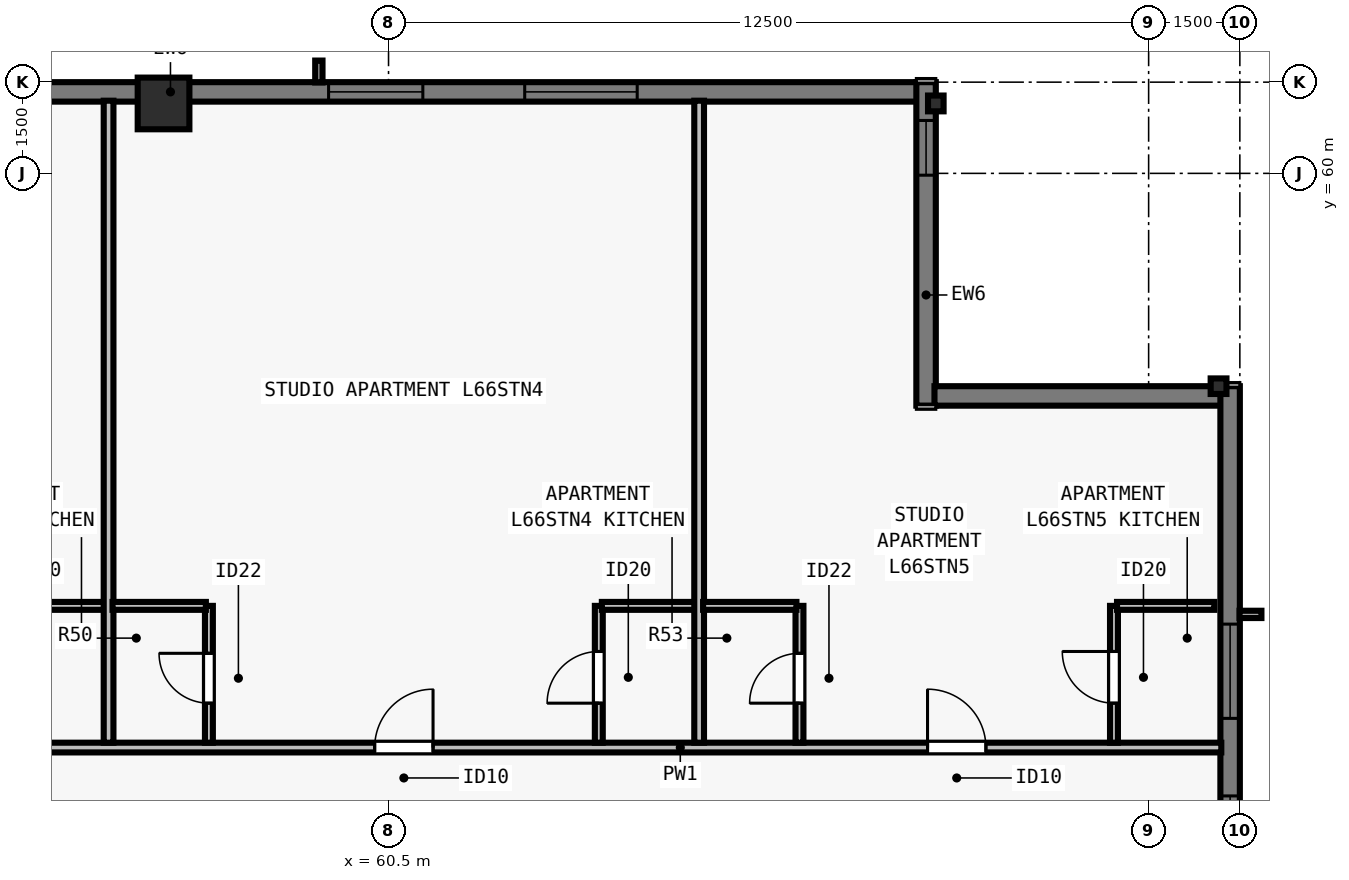
"""IFC4 building model, lengths in metres.
Left out: names, types, materials, properties, quantities, classifications, styles, units other than length and angle.
Written with IfcOpenShell. Run it as: python <this file> out.ifc"""

import sys

from ifc_helpers import new_model, si_unit, direction, frame, frame_2d, origin, origin_2d, place, context, subcontext, project, spatial, rectangle, i_section, extrude, element, fill, save


model = new_model("IFC4")
c1 = context("Model", 3, precision=1e-05, world=origin(), true_north=direction((0.0, 1.0)))
c2 = subcontext(c1, "Body", "Model", "MODEL_VIEW")
j1 = project(units=[si_unit("LENGTHUNIT", "METRE"), si_unit("PLANEANGLEUNIT", "RADIAN")], contexts=[c1])
p1 = place(None, origin())
s1 = spatial("IfcSite", under=j1, at=p1, CompositionType="ELEMENT")
p2 = place(p1, origin())
s2 = spatial("IfcBuilding", under=s1, at=p2, CompositionType="ELEMENT")
p3 = place(p2, frame((0.0, 0.0, 241.0)))
s3 = spatial("IfcBuildingStorey", under=s2, at=p3, CompositionType="ELEMENT", Elevation=241.0)
for number, where, z_axis, x_axis in (
    (1, (74.15, 56.5, 0.0), (0.0, 0.0, 1.0), (0.0, 1.0, 0.0)),
    (2, (69.5, 61.15, 0.0), (0.0, 0.0, 1.0), (1.0, 0.0, 0.0)),
):
    element("IfcColumn", number, at=place(p3, frame(where, z_axis=z_axis, x_axis=x_axis)), inside=s3, PredefinedType="COLUMN", context=c2, shape_type="SweptSolid", body=[
        extrude(i_section(OverallWidth=0.256, OverallDepth=0.26, WebThickness=0.01, FlangeThickness=0.017, FilletRadius=0.013, at=origin_2d()), origin(), (0.0, 0.0, 1.0), 3.5),
    ])
p4 = place(p3, frame((56.8, 61.15, 0.0), z_axis=(0.0, 0.0, 1.0), x_axis=(1.0, 0.0, 0.0)))
e3 = element("IfcColumn", 3, at=p4, inside=s3, PredefinedType="COLUMN", context=c2, shape_type="SweptSolid", body=[
    extrude(rectangle(XDim=0.85, YDim=0.85, at=origin_2d()), origin(), (0.0, 0.0, 1.0), 3.5),
])
p5 = place(p3, frame((34.5, 61.34, 0.0), z_axis=(0.0, 0.0, 1.0), x_axis=(1.0, 0.0, 0.0)))
e4 = element("IfcWall", 4, at=p5, inside=s3, PredefinedType="SOLIDWALL", context=c2, shape_type="SweptSolid", body=[
    extrude(rectangle(XDim=34.702, YDim=0.32, at=frame_2d((17.351, 0.0))), origin(), (0.0, 0.0, 1.0), 3.29),
])
p6 = place(p5, frame((4.763, 0.0, 0.8)))
e5 = element("IfcOpeningElement", 5, at=p6, cuts=e4, PredefinedType="OPENING", context=c2, shape_type="SweptSolid", body=[
    extrude(rectangle(XDim=1.55, YDim=1.678, at=frame_2d((0.775, 0.839))), frame((0.0, 0.17, 0.0), z_axis=(0.0, -1.0, 0.0), x_axis=(1.0, 0.0, 0.0)), (0.0, 0.0, 1.0), 0.34),
])
p7 = place(p5, frame((7.988, 0.0, 0.8)))
e6 = element("IfcOpeningElement", 6, at=p7, cuts=e4, PredefinedType="OPENING", context=c2, shape_type="SweptSolid", body=[
    extrude(rectangle(XDim=1.85, YDim=1.678, at=frame_2d((0.925, 0.839))), frame((0.0, 0.17, 0.0), z_axis=(0.0, -1.0, 0.0), x_axis=(1.0, 0.0, 0.0)), (0.0, 0.0, 1.0), 0.34),
])
p8 = place(p5, frame((10.263, 0.0, 0.8)))
e7 = element("IfcOpeningElement", 7, at=p8, cuts=e4, PredefinedType="OPENING", context=c2, shape_type="SweptSolid", body=[
    extrude(rectangle(XDim=1.55, YDim=1.678, at=frame_2d((0.775, 0.839))), frame((0.0, 0.17, 0.0), z_axis=(0.0, -1.0, 0.0), x_axis=(1.0, 0.0, 0.0)), (0.0, 0.0, 1.0), 0.34),
])
p9 = place(p5, frame((14.738, 0.0, 0.8)))
e8 = element("IfcOpeningElement", 8, at=p9, cuts=e4, PredefinedType="OPENING", context=c2, shape_type="SweptSolid", body=[
    extrude(rectangle(XDim=1.85, YDim=1.678, at=frame_2d((0.925, 0.839))), frame((0.0, 0.17, 0.0), z_axis=(0.0, -1.0, 0.0), x_axis=(1.0, 0.0, 0.0)), (0.0, 0.0, 1.0), 0.34),
])
p10 = place(p5, frame((18.264, 0.0, 0.8)))
e9 = element("IfcOpeningElement", 9, at=p10, cuts=e4, PredefinedType="OPENING", context=c2, shape_type="SweptSolid", body=[
    extrude(rectangle(XDim=1.55, YDim=1.678, at=frame_2d((0.775, 0.839))), frame((0.0, 0.17, 0.0), z_axis=(0.0, -1.0, 0.0), x_axis=(1.0, 0.0, 0.0)), (0.0, 0.0, 1.0), 0.34),
])
p11 = place(p5, frame((25.014, 0.0, 0.8)))
e10 = element("IfcOpeningElement", 10, at=p11, cuts=e4, PredefinedType="OPENING", context=c2, shape_type="SweptSolid", body=[
    extrude(rectangle(XDim=1.55, YDim=1.678, at=frame_2d((0.775, 0.839))), frame((0.0, 0.17, 0.0), z_axis=(0.0, -1.0, 0.0), x_axis=(1.0, 0.0, 0.0)), (0.0, 0.0, 1.0), 0.34),
])
p12 = place(p5, frame((28.24, 0.0, 0.8)))
e11 = element("IfcOpeningElement", 11, at=p12, cuts=e4, PredefinedType="OPENING", context=c2, shape_type="SweptSolid", body=[
    extrude(rectangle(XDim=1.85, YDim=1.678, at=frame_2d((0.925, 0.839))), frame((0.0, 0.17, 0.0), z_axis=(0.0, -1.0, 0.0), x_axis=(1.0, 0.0, 0.0)), (0.0, 0.0, 1.0), 0.34),
])
p13 = place(p3, frame((69.34, 61.5, 0.0), z_axis=(0.0, 0.0, 1.0), x_axis=(0.0, -1.0, 0.0)))
e12 = element("IfcWall", 12, at=p13, inside=s3, PredefinedType="SOLIDWALL", context=c2, shape_type="SweptSolid", body=[
    extrude(rectangle(XDim=5.32, YDim=0.32, at=frame_2d((2.66, 0.0))), origin(), (0.0, 0.0, 1.0), 3.29),
])
p14 = place(p13, frame((0.63, 0.0, 0.8)))
e13 = element("IfcOpeningElement", 13, at=p14, cuts=e12, PredefinedType="OPENING", context=c2, shape_type="SweptSolid", body=[
    extrude(rectangle(XDim=0.9, YDim=1.678, at=frame_2d((0.45, 0.839))), frame((0.0, 0.17, 0.0), z_axis=(0.0, -1.0, 0.0), x_axis=(1.0, 0.0, 0.0)), (0.0, 0.0, 1.0), 0.34),
])
p15 = place(p3, frame((69.478, 56.34, 0.0), z_axis=(0.0, 0.0, 1.0), x_axis=(1.0, 0.0, 0.0)))
e14 = element("IfcWall", 14, at=p15, inside=s3, PredefinedType="SOLIDWALL", context=c2, shape_type="SweptSolid", body=[
    extrude(rectangle(XDim=4.724, YDim=0.32, at=frame_2d((2.362, 0.0))), origin(), (0.0, 0.0, 1.0), 3.29),
])
p16 = place(p3, frame((74.34, 56.5, 0.0), z_axis=(0.0, 0.0, 1.0), x_axis=(0.0, -1.0, 0.0)))
e15 = element("IfcWall", 15, at=p16, inside=s3, PredefinedType="SOLIDWALL", context=c2, shape_type="SweptSolid", body=[
    extrude(rectangle(XDim=34.702, YDim=0.32, at=frame_2d((17.351, 0.0))), origin(), (0.0, 0.0, 1.0), 3.29),
])
p17 = place(p16, frame((3.913, 0.0, 0.8)))
e16 = element("IfcOpeningElement", 16, at=p17, cuts=e15, PredefinedType="OPENING", context=c2, shape_type="SweptSolid", body=[
    extrude(rectangle(XDim=1.55, YDim=1.678, at=frame_2d((0.775, 0.839))), frame((0.0, 0.17, 0.0), z_axis=(0.0, -1.0, 0.0), x_axis=(1.0, 0.0, 0.0)), (0.0, 0.0, 1.0), 0.34),
])
p18 = place(p16, frame((6.738, 0.0, 0.8)))
e17 = element("IfcOpeningElement", 17, at=p18, cuts=e15, PredefinedType="OPENING", context=c2, shape_type="SweptSolid", body=[
    extrude(rectangle(XDim=1.85, YDim=1.678, at=frame_2d((0.925, 0.839))), frame((0.0, 0.17, 0.0), z_axis=(0.0, -1.0, 0.0), x_axis=(1.0, 0.0, 0.0)), (0.0, 0.0, 1.0), 0.34),
])
p19 = place(p16, frame((10.263, 0.0, 0.8)))
e18 = element("IfcOpeningElement", 18, at=p19, cuts=e15, PredefinedType="OPENING", context=c2, shape_type="SweptSolid", body=[
    extrude(rectangle(XDim=1.55, YDim=1.678, at=frame_2d((0.775, 0.839))), frame((0.0, 0.17, 0.0), z_axis=(0.0, -1.0, 0.0), x_axis=(1.0, 0.0, 0.0)), (0.0, 0.0, 1.0), 0.34),
])
p20 = place(p16, frame((14.738, 0.0, 0.8)))
e19 = element("IfcOpeningElement", 19, at=p20, cuts=e15, PredefinedType="OPENING", context=c2, shape_type="SweptSolid", body=[
    extrude(rectangle(XDim=1.85, YDim=1.678, at=frame_2d((0.925, 0.839))), frame((0.0, 0.17, 0.0), z_axis=(0.0, -1.0, 0.0), x_axis=(1.0, 0.0, 0.0)), (0.0, 0.0, 1.0), 0.34),
])
p21 = place(p16, frame((18.264, 0.0, 0.8)))
e20 = element("IfcOpeningElement", 20, at=p21, cuts=e15, PredefinedType="OPENING", context=c2, shape_type="SweptSolid", body=[
    extrude(rectangle(XDim=1.55, YDim=1.678, at=frame_2d((0.775, 0.839))), frame((0.0, 0.17, 0.0), z_axis=(0.0, -1.0, 0.0), x_axis=(1.0, 0.0, 0.0)), (0.0, 0.0, 1.0), 0.34),
])
p22 = place(p16, frame((24.164, 0.0, 0.8)))
e21 = element("IfcOpeningElement", 21, at=p22, cuts=e15, PredefinedType="OPENING", context=c2, shape_type="SweptSolid", body=[
    extrude(rectangle(XDim=1.55, YDim=1.678, at=frame_2d((0.775, 0.839))), frame((0.0, 0.17, 0.0), z_axis=(0.0, -1.0, 0.0), x_axis=(1.0, 0.0, 0.0)), (0.0, 0.0, 1.0), 0.34),
])
p23 = place(p3, frame((29.805, 50.558, 0.0), z_axis=(0.0, 0.0, 1.0), x_axis=(1.0, 0.0, 0.0)))
e22 = element("IfcWall", 22, at=p23, inside=s3, PredefinedType="PARTITIONING", context=c2, shape_type="SweptSolid", body=[
    extrude(rectangle(XDim=44.39, YDim=0.16, at=frame_2d((22.195, 0.0))), origin(), (0.0, 0.0, 1.0), 2.958),
])
p24 = place(p23, frame((3.791, 0.0, 0.0)))
e23 = element("IfcOpeningElement", 23, at=p24, cuts=e22, PredefinedType="OPENING", context=c2, shape_type="SweptSolid", body=[
    extrude(rectangle(XDim=0.96, YDim=2.18, at=frame_2d((0.48, 1.09))), frame((0.0, 0.09, 0.0), z_axis=(0.0, -1.0, 0.0), x_axis=(1.0, 0.0, 0.0)), (0.0, 0.0, 1.0), 0.18),
])
p25 = place(p23, frame((12.803, 0.0, 0.0)))
e24 = element("IfcOpeningElement", 24, at=p25, cuts=e22, PredefinedType="OPENING", context=c2, shape_type="SweptSolid", body=[
    extrude(rectangle(XDim=0.96, YDim=2.18, at=frame_2d((0.48, 1.09))), frame((0.0, 0.09, 0.0), z_axis=(0.0, -1.0, 0.0), x_axis=(1.0, 0.0, 0.0)), (0.0, 0.0, 1.0), 0.18),
])
p26 = place(p23, frame((21.635, 0.0, 0.0)))
e25 = element("IfcOpeningElement", 25, at=p26, cuts=e22, PredefinedType="OPENING", context=c2, shape_type="SweptSolid", body=[
    extrude(rectangle(XDim=0.96, YDim=2.18, at=frame_2d((0.48, 1.09))), frame((0.0, 0.09, 0.0), z_axis=(0.0, -1.0, 0.0), x_axis=(1.0, 0.0, 0.0)), (0.0, 0.0, 1.0), 0.18),
])
p27 = place(p23, frame((30.467, 0.0, 0.0)))
e26 = element("IfcOpeningElement", 26, at=p27, cuts=e22, PredefinedType="OPENING", context=c2, shape_type="SweptSolid", body=[
    extrude(rectangle(XDim=0.96, YDim=2.18, at=frame_2d((0.48, 1.09))), frame((0.0, 0.09, 0.0), z_axis=(0.0, -1.0, 0.0), x_axis=(1.0, 0.0, 0.0)), (0.0, 0.0, 1.0), 0.18),
])
p28 = place(p23, frame((39.559, 0.0, 0.0)))
e27 = element("IfcOpeningElement", 27, at=p28, cuts=e22, PredefinedType="OPENING", context=c2, shape_type="SweptSolid", body=[
    extrude(rectangle(XDim=0.96, YDim=2.18, at=frame_2d((0.48, 1.09))), frame((0.0, 0.09, 0.0), z_axis=(0.0, -1.0, 0.0), x_axis=(1.0, 0.0, 0.0)), (0.0, 0.0, 1.0), 0.18),
])
p29 = place(p3, frame((54.296, 52.887, 0.0), z_axis=(0.0, 0.0, 1.0), x_axis=(1.0, 0.0, 0.0)))
e28 = element("IfcWall", 28, at=p29, inside=s3, PredefinedType="PLUMBINGWALL", context=c2, shape_type="SweptSolid", body=[
    extrude(rectangle(XDim=1.6, YDim=0.13, at=frame_2d((0.8, 0.0))), origin(), (0.0, 0.0, 1.0), 3.29),
])
p30 = place(p3, frame((55.896, 50.637, 0.0), z_axis=(0.0, 0.0, 1.0), x_axis=(0.0, 1.0, 0.0)))
e29 = element("IfcWall", 29, at=p30, inside=s3, PredefinedType="PARTITIONING", context=c2, shape_type="SweptSolid", body=[
    extrude(rectangle(XDim=10.558, YDim=0.16, at=frame_2d((5.279, 0.0))), origin(), (0.0, 0.0, 1.0), 2.958),
])
p31 = place(p3, frame((57.546, 50.637, 0.0), z_axis=(0.0, 0.0, 1.0), x_axis=(0.0, 1.0, 0.0)))
e30 = element("IfcWall", 30, at=p31, inside=s3, PredefinedType="PLUMBINGWALL", context=c2, shape_type="SweptSolid", body=[
    extrude(rectangle(XDim=2.25, YDim=0.13, at=frame_2d((1.125, 0.0))), origin(), (0.0, 0.0, 1.0), 3.29),
])
p32 = place(p31, frame((0.65, 0.0, 0.0)))
e31 = element("IfcOpeningElement", 31, at=p32, cuts=e30, PredefinedType="OPENING", context=c2, shape_type="SweptSolid", body=[
    extrude(rectangle(XDim=0.82, YDim=2.1, at=frame_2d((0.41, 1.05))), frame((0.0, 0.075, 0.0), z_axis=(0.0, -1.0, 0.0), x_axis=(1.0, 0.0, 0.0)), (0.0, 0.0, 1.0), 0.15),
])
p33 = place(p3, frame((55.961, 52.887, 0.0), z_axis=(0.0, 0.0, 1.0), x_axis=(1.0, 0.0, 0.0)))
e32 = element("IfcWall", 32, at=p33, inside=s3, PredefinedType="PLUMBINGWALL", context=c2, shape_type="SweptSolid", body=[
    extrude(rectangle(XDim=1.535, YDim=0.13, at=frame_2d((0.768, 0.0))), origin(), (0.0, 0.0, 1.0), 3.29),
])
p34 = place(p3, frame((63.958, 50.637, 0.0), z_axis=(0.0, 0.0, 1.0), x_axis=(0.0, 1.0, 0.0)))
e33 = element("IfcWall", 33, at=p34, inside=s3, PredefinedType="PLUMBINGWALL", context=c2, shape_type="SweptSolid", body=[
    extrude(rectangle(XDim=2.25, YDim=0.13, at=frame_2d((1.125, 0.0))), origin(), (0.0, 0.0, 1.0), 2.573),
])
p35 = place(p34, frame((0.65, 0.0, 0.0)))
e34 = element("IfcOpeningElement", 34, at=p35, cuts=e33, PredefinedType="OPENING", context=c2, shape_type="SweptSolid", body=[
    extrude(rectangle(XDim=0.85, YDim=2.1, at=frame_2d((0.425, 1.05))), frame((0.0, 0.075, 0.0), z_axis=(0.0, -1.0, 0.0), x_axis=(1.0, 0.0, 0.0)), (0.0, 0.0, 1.0), 0.15),
])
p36 = place(p3, frame((64.008, 52.887, 0.0), z_axis=(0.0, 0.0, 1.0), x_axis=(1.0, 0.0, 0.0)))
e35 = element("IfcWall", 35, at=p36, inside=s3, PredefinedType="PLUMBINGWALL", context=c2, shape_type="SweptSolid", body=[
    extrude(rectangle(XDim=1.6, YDim=0.13, at=frame_2d((0.8, 0.0))), origin(), (0.0, 0.0, 1.0), 3.29),
])
p37 = place(p3, frame((65.608, 50.637, 0.0), z_axis=(0.0, 0.0, 1.0), x_axis=(0.0, 1.0, 0.0)))
e36 = element("IfcWall", 36, at=p37, inside=s3, PredefinedType="PARTITIONING", context=c2, shape_type="SweptSolid", body=[
    extrude(rectangle(XDim=10.558, YDim=0.16, at=frame_2d((5.279, 0.0))), origin(), (0.0, 0.0, 1.0), 2.573),
])
p38 = place(p3, frame((67.258, 50.637, 0.0), z_axis=(0.0, 0.0, 1.0), x_axis=(0.0, 1.0, 0.0)))
e37 = element("IfcWall", 37, at=p38, inside=s3, PredefinedType="PLUMBINGWALL", context=c2, shape_type="SweptSolid", body=[
    extrude(rectangle(XDim=2.25, YDim=0.13, at=frame_2d((1.125, 0.0))), origin(), (0.0, 0.0, 1.0), 3.29),
])
p39 = place(p38, frame((0.65, 0.0, 0.0)))
e38 = element("IfcOpeningElement", 38, at=p39, cuts=e37, PredefinedType="OPENING", context=c2, shape_type="SweptSolid", body=[
    extrude(rectangle(XDim=0.82, YDim=2.1, at=frame_2d((0.41, 1.05))), frame((0.0, 0.075, 0.0), z_axis=(0.0, -1.0, 0.0), x_axis=(1.0, 0.0, 0.0)), (0.0, 0.0, 1.0), 0.15),
])
p40 = place(p3, frame((65.673, 52.887, 0.0), z_axis=(0.0, 0.0, 1.0), x_axis=(1.0, 0.0, 0.0)))
e39 = element("IfcWall", 39, at=p40, inside=s3, PredefinedType="PLUMBINGWALL", context=c2, shape_type="SweptSolid", body=[
    extrude(rectangle(XDim=1.535, YDim=0.13, at=frame_2d((0.768, 0.0))), origin(), (0.0, 0.0, 1.0), 3.29),
])
p41 = place(p3, frame((72.43, 50.637, 0.0), z_axis=(0.0, 0.0, 1.0), x_axis=(0.0, 1.0, 0.0)))
e40 = element("IfcWall", 40, at=p41, inside=s3, PredefinedType="PLUMBINGWALL", context=c2, shape_type="SweptSolid", body=[
    extrude(rectangle(XDim=2.25, YDim=0.13, at=frame_2d((1.125, 0.0))), origin(), (0.0, 0.0, 1.0), 3.29),
])
p42 = place(p41, frame((0.65, 0.0, 0.0)))
e41 = element("IfcOpeningElement", 41, at=p42, cuts=e40, PredefinedType="OPENING", context=c2, shape_type="SweptSolid", body=[
    extrude(rectangle(XDim=0.85, YDim=2.1, at=frame_2d((0.425, 1.05))), frame((0.0, 0.075, 0.0), z_axis=(0.0, -1.0, 0.0), x_axis=(1.0, 0.0, 0.0)), (0.0, 0.0, 1.0), 0.15),
])
p43 = place(p3, frame((72.48, 52.887, 0.0), z_axis=(0.0, 0.0, 1.0), x_axis=(1.0, 0.0, 0.0)))
e42 = element("IfcWall", 42, at=p43, inside=s3, PredefinedType="PLUMBINGWALL", context=c2, shape_type="SweptSolid", body=[
    extrude(rectangle(XDim=1.6, YDim=0.13, at=frame_2d((0.8, 0.0))), origin(), (0.0, 0.0, 1.0), 3.29),
])
p44 = place(p11, origin())
e43 = element("IfcWindow", 43, at=p44, inside=s3, PartitioningType="SINGLE_PANEL", PredefinedType="WINDOW", context=c2, shape_type="SweptSolid", body=[
    extrude(rectangle(XDim=1.55, YDim=1.678, at=frame_2d((0.775, 0.839))), frame((0.0, -0.05, 0.0), z_axis=(0.0, -1.0, 0.0), x_axis=(1.0, 0.0, 0.0)), (0.0, 0.0, 1.0), 0.06),
])
fill(e10, e43)
p45 = place(p12, origin())
e44 = element("IfcWindow", 44, at=p45, inside=s3, PartitioningType="SINGLE_PANEL", PredefinedType="WINDOW", context=c2, shape_type="SweptSolid", body=[
    extrude(rectangle(XDim=1.85, YDim=1.678, at=frame_2d((0.925, 0.839))), frame((0.0, -0.05, 0.0), z_axis=(0.0, -1.0, 0.0), x_axis=(1.0, 0.0, 0.0)), (0.0, 0.0, 1.0), 0.06),
])
fill(e11, e44)
p46 = place(p17, origin())
e45 = element("IfcWindow", 45, at=p46, inside=s3, PartitioningType="SINGLE_PANEL", PredefinedType="WINDOW", context=c2, shape_type="SweptSolid", body=[
    extrude(rectangle(XDim=1.55, YDim=1.678, at=frame_2d((0.775, 0.839))), frame((0.0, -0.05, 0.0), z_axis=(0.0, -1.0, 0.0), x_axis=(1.0, 0.0, 0.0)), (0.0, 0.0, 1.0), 0.06),
])
fill(e16, e45)
p47 = place(p18, origin())
e46 = element("IfcWindow", 46, at=p47, inside=s3, PartitioningType="SINGLE_PANEL", PredefinedType="WINDOW", context=c2, shape_type="SweptSolid", body=[
    extrude(rectangle(XDim=1.85, YDim=1.678, at=frame_2d((0.925, 0.839))), frame((0.0, -0.05, 0.0), z_axis=(0.0, -1.0, 0.0), x_axis=(1.0, 0.0, 0.0)), (0.0, 0.0, 1.0), 0.06),
])
fill(e17, e46)
p48 = place(p14, origin())
e47 = element("IfcWindow", 47, at=p48, inside=s3, PartitioningType="SINGLE_PANEL", PredefinedType="WINDOW", context=c2, shape_type="SweptSolid", body=[
    extrude(rectangle(XDim=0.9, YDim=1.678, at=frame_2d((0.45, 0.839))), frame((0.0, -0.04, 0.0), z_axis=(0.0, -1.0, 0.0), x_axis=(1.0, 0.0, 0.0)), (0.0, 0.0, 1.0), 0.06),
])
fill(e13, e47)
p49 = place(p32, origin())
e48 = element("IfcDoor", 48, at=p49, inside=s3, OperationType="SINGLE_SWING_RIGHT", PredefinedType="DOOR", context=c2, shape_type="SweptSolid", body=[
    extrude(rectangle(XDim=0.82, YDim=2.1, at=frame_2d((0.41, 1.05))), frame((0.0, 0.025, 0.0), z_axis=(0.0, -1.0, 0.0), x_axis=(1.0, 0.0, 0.0)), (0.0, 0.0, 1.0), 0.05),
])
fill(e31, e48)
p50 = place(p35, origin())
e49 = element("IfcDoor", 49, at=p50, inside=s3, OperationType="SINGLE_SWING_LEFT", PredefinedType="DOOR", context=c2, shape_type="SweptSolid", body=[
    extrude(rectangle(XDim=0.85, YDim=2.1, at=frame_2d((0.425, 1.05))), frame((0.0, 0.025, 0.0), z_axis=(0.0, -1.0, 0.0), x_axis=(1.0, 0.0, 0.0)), (0.0, 0.0, 1.0), 0.05),
])
fill(e34, e49)
p51 = place(p27, origin())
e50 = element("IfcDoor", 50, at=p51, inside=s3, OperationType="SINGLE_SWING_RIGHT", PredefinedType="DOOR", context=c2, shape_type="SweptSolid", body=[
    extrude(rectangle(XDim=0.96, YDim=2.18, at=frame_2d((0.48, 1.09))), frame((0.0, 0.025, 0.0), z_axis=(0.0, -1.0, 0.0), x_axis=(1.0, 0.0, 0.0)), (0.0, 0.0, 1.0), 0.05),
])
fill(e26, e50)
p52 = place(p39, origin())
e51 = element("IfcDoor", 51, at=p52, inside=s3, OperationType="SINGLE_SWING_LEFT", PredefinedType="DOOR", context=c2, shape_type="SweptSolid", body=[
    extrude(rectangle(XDim=0.82, YDim=2.1, at=frame_2d((0.41, 1.05))), frame((0.0, 0.025, 0.0), z_axis=(0.0, -1.0, 0.0), x_axis=(1.0, 0.0, 0.0)), (0.0, 0.0, 1.0), 0.05),
])
fill(e38, e51)
p53 = place(p42, origin())
e52 = element("IfcDoor", 52, at=p53, inside=s3, OperationType="SINGLE_SWING_RIGHT", PredefinedType="DOOR", context=c2, shape_type="SweptSolid", body=[
    extrude(rectangle(XDim=0.85, YDim=2.1, at=frame_2d((0.425, 1.05))), frame((0.0, 0.025, 0.0), z_axis=(0.0, -1.0, 0.0), x_axis=(1.0, 0.0, 0.0)), (0.0, 0.0, 1.0), 0.05),
])
fill(e41, e52)
p54 = place(p28, origin())
e53 = element("IfcDoor", 53, at=p54, inside=s3, OperationType="SINGLE_SWING_LEFT", PredefinedType="DOOR", context=c2, shape_type="SweptSolid", body=[
    extrude(rectangle(XDim=0.96, YDim=2.18, at=frame_2d((0.48, 1.09))), frame((0.0, 0.025, 0.0), z_axis=(0.0, -1.0, 0.0), x_axis=(1.0, 0.0, 0.0)), (0.0, 0.0, 1.0), 0.05),
])
fill(e27, e53)
save(model, sys.argv[1])
